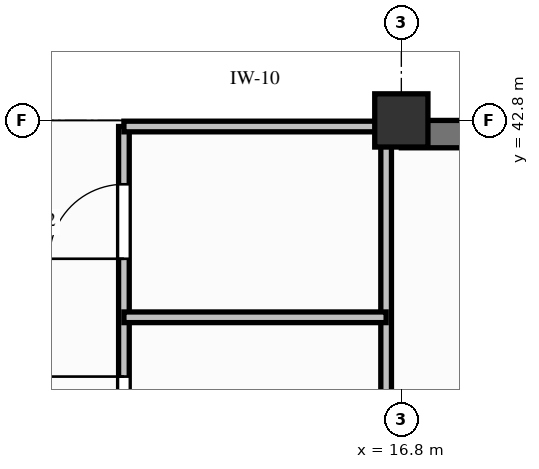
"""IFC4 building model, lengths in metres.
Left out: names, types, materials, properties, quantities, classifications, styles, units other than length and angle.
Written with IfcOpenShell. Run it as: python <this file> out.ifc"""

import sys

from ifc_helpers import new_model, si_unit, direction, frame, frame_2d, origin, origin_2d, place, context, subcontext, project, spatial, rectangle, extrude, element, fill, save


model = new_model("IFC4")
c1 = context("Model", 3, precision=1e-05, world=origin(), true_north=direction((0.0, 1.0)))
c2 = subcontext(c1, "Body", "Model", "MODEL_VIEW")
j1 = project(units=[si_unit("LENGTHUNIT", "METRE"), si_unit("PLANEANGLEUNIT", "RADIAN")], contexts=[c1])
p1 = place(None, origin())
s1 = spatial("IfcSite", under=j1, at=p1, CompositionType="ELEMENT")
p2 = place(p1, origin())
s2 = spatial("IfcBuilding", under=s1, at=p2, CompositionType="ELEMENT")
p3 = place(p2, frame((0.0, 0.0, -4.5)))
s3 = spatial("IfcBuildingStorey", under=s2, at=p3, CompositionType="ELEMENT", Elevation=-4.5)
p4 = place(p3, frame((16.8, 42.62, 0.0), z_axis=(0.0, 0.0, 1.0), x_axis=(1.0, 0.0, 0.0)))
e1 = element("IfcWall", 1, at=p4, inside=s3, PredefinedType="USERDEFINED", context=c2, shape_type="SweptSolid", body=[
    extrude(rectangle(XDim=40.2, YDim=0.36, at=frame_2d((20.1, 0.0))), origin(), (0.0, 0.0, 1.0), 4.5),
])
p5 = place(p3, frame((16.8, 42.8, 0.0), z_axis=(0.0, 0.0, 1.0), x_axis=(1.0, 0.0, 0.0)))
e2 = element("IfcColumn", 2, at=p5, inside=s3, PredefinedType="COLUMN", context=c2, shape_type="SweptSolid", body=[
    extrude(rectangle(XDim=0.7, YDim=0.7, at=origin_2d()), origin(), (0.0, 0.0, 1.0), 4.5),
])
p6 = place(p3, frame((13.15, 34.9, 0.0), z_axis=(0.0, 0.0, 1.0), x_axis=(0.0, 1.0, 0.0)))
e3 = element("IfcWall", 3, at=p6, inside=s3, PredefinedType="PARTITIONING", context=c2, shape_type="SweptSolid", body=[
    extrude(rectangle(XDim=7.82, YDim=0.14, at=frame_2d((3.91, 0.0))), origin(), (0.0, 0.0, 1.0), 3.313),
])
p7 = place(p6, frame((0.9, 0.0, 0.0)))
e4 = element("IfcOpeningElement", 4, at=p7, cuts=e3, PredefinedType="OPENING", context=c2, shape_type="SweptSolid", body=[
    extrude(rectangle(XDim=0.95, YDim=2.12, at=frame_2d((0.475, 1.06))), frame((0.0, 0.08, 0.0), z_axis=(0.0, -1.0, 0.0), x_axis=(1.0, 0.0, 0.0)), (0.0, 0.0, 1.0), 0.16),
])
p8 = place(p6, frame((3.55, 0.0, 0.0)))
e5 = element("IfcOpeningElement", 5, at=p8, cuts=e3, PredefinedType="OPENING", context=c2, shape_type="SweptSolid", body=[
    extrude(rectangle(XDim=0.98, YDim=2.14, at=frame_2d((0.49, 1.07))), frame((0.0, 0.08, 0.0), z_axis=(0.0, -1.0, 0.0), x_axis=(1.0, 0.0, 0.0)), (0.0, 0.0, 1.0), 0.16),
])
p9 = place(p6, frame((6.08, 0.0, 0.0)))
e6 = element("IfcOpeningElement", 6, at=p9, cuts=e3, PredefinedType="OPENING", context=c2, shape_type="SweptSolid", body=[
    extrude(rectangle(XDim=0.98, YDim=2.14, at=frame_2d((0.49, 1.07))), frame((0.0, 0.08, 0.0), z_axis=(0.0, -1.0, 0.0), x_axis=(1.0, 0.0, 0.0)), (0.0, 0.0, 1.0), 0.16),
])
p10 = place(p3, frame((16.6, 34.9, 0.0), z_axis=(0.0, 0.0, 1.0), x_axis=(0.0, 1.0, 0.0)))
e7 = element("IfcWall", 7, at=p10, inside=s3, PredefinedType="PARTITIONING", context=c2, shape_type="SweptSolid", body=[
    extrude(rectangle(XDim=7.82, YDim=0.14, at=frame_2d((3.91, 0.0))), origin(), (0.0, 0.0, 1.0), 3.313),
])
p11 = place(p3, frame((13.15, 42.72, 0.0), z_axis=(0.0, 0.0, 1.0), x_axis=(1.0, 0.0, 0.0)))
e8 = element("IfcWall", 8, at=p11, inside=s3, PredefinedType="PARTITIONING", context=c2, shape_type="SweptSolid", body=[
    extrude(rectangle(XDim=3.45, YDim=0.14, at=frame_2d((1.725, 0.0))), origin(), (0.0, 0.0, 1.0), 3.313),
])
p12 = place(p3, frame((13.15, 40.21, 0.0), z_axis=(0.0, 0.0, 1.0), x_axis=(1.0, 0.0, 0.0)))
e9 = element("IfcWall", 9, at=p12, inside=s3, PredefinedType="PARTITIONING", context=c2, shape_type="SweptSolid", body=[
    extrude(rectangle(XDim=3.45, YDim=0.14, at=frame_2d((1.725, 0.0))), origin(), (0.0, 0.0, 1.0), 3.513),
])
p13 = place(p8, origin())
e10 = element("IfcDoor", 10, at=p13, inside=s3, OperationType="SINGLE_SWING_RIGHT", PredefinedType="DOOR", context=c2, shape_type="SweptSolid", body=[
    extrude(rectangle(XDim=0.98, YDim=2.14, at=frame_2d((0.49, 1.07))), frame((0.0, 0.025, 0.0), z_axis=(0.0, -1.0, 0.0), x_axis=(1.0, 0.0, 0.0)), (0.0, 0.0, 1.0), 0.05),
])
fill(e5, e10)
p14 = place(p9, origin())
e11 = element("IfcDoor", 11, at=p14, inside=s3, OperationType="SINGLE_SWING_LEFT", PredefinedType="DOOR", context=c2, shape_type="SweptSolid", body=[
    extrude(rectangle(XDim=0.98, YDim=2.14, at=frame_2d((0.49, 1.07))), frame((0.0, 0.025, 0.0), z_axis=(0.0, -1.0, 0.0), x_axis=(1.0, 0.0, 0.0)), (0.0, 0.0, 1.0), 0.05),
])
fill(e6, e11)
save(model, sys.argv[1])
